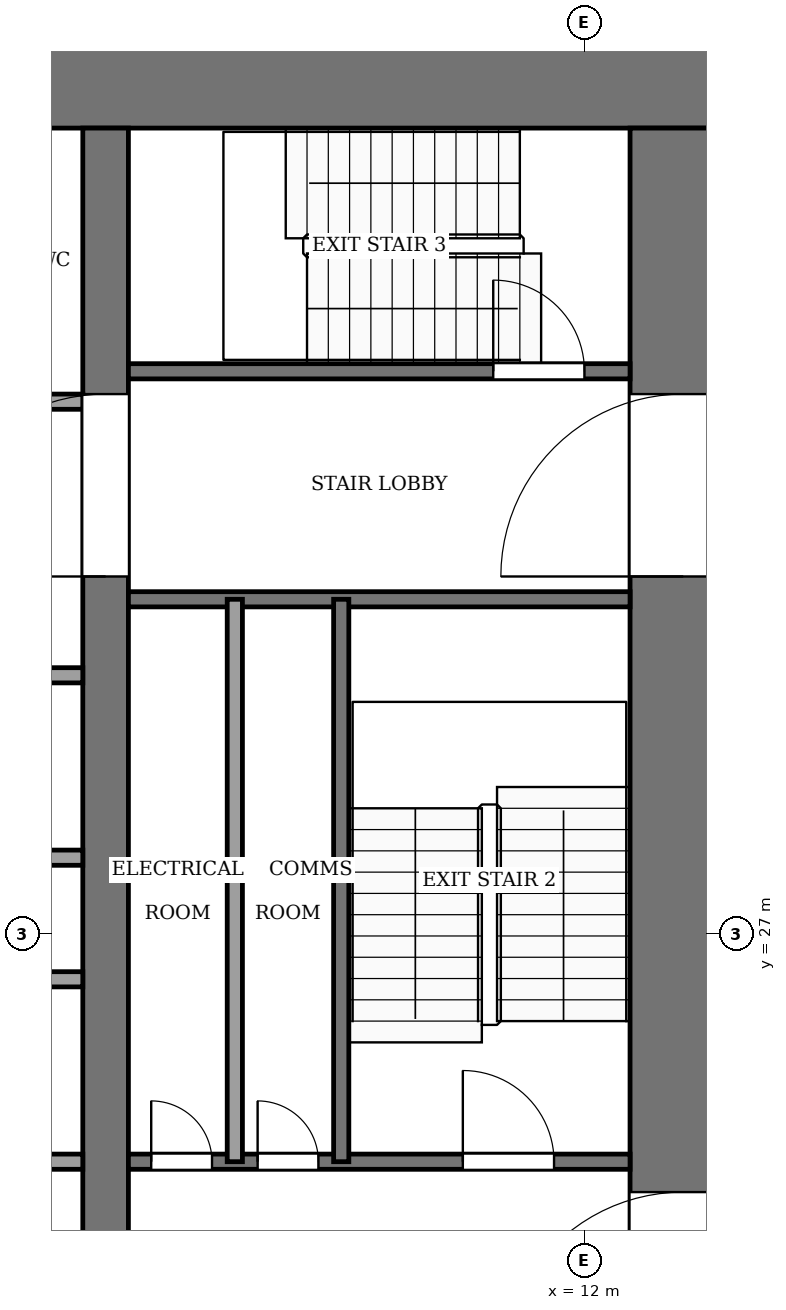
"""IFC4 building model, lengths in metres.
Left out: names, types, materials, properties, quantities, classifications, styles, units other than length and angle.
Written with IfcOpenShell. Run it as: python <this file> out.ifc"""

import sys

from ifc_helpers import new_model, si_unit, direction, frame, frame_2d, origin, place, context, subcontext, project, spatial, rectangle, extrude, element, fill, save


model = new_model("IFC4")
c1 = context("Model", 3, precision=1e-05, world=origin(), true_north=direction((0.0, 1.0)))
c2 = subcontext(c1, "Body", "Model", "MODEL_VIEW")
j1 = project(units=[si_unit("LENGTHUNIT", "METRE"), si_unit("PLANEANGLEUNIT", "RADIAN")], contexts=[c1])
p1 = place(None, origin())
s1 = spatial("IfcSite", under=j1, at=p1, CompositionType="ELEMENT")
p2 = place(p1, origin())
s2 = spatial("IfcBuilding", under=s1, at=p2, CompositionType="ELEMENT")
p3 = place(p2, frame((0.0, 0.0, 46.0)))
s3 = spatial("IfcBuildingStorey", under=s2, at=p3, CompositionType="ELEMENT", Elevation=46.0)
p4 = place(p3, frame((-14.0, 38.3, -0.13), z_axis=(0.0, 0.0, 1.0), x_axis=(1.0, 0.0, 0.0)))
e1 = element("IfcWall", 1, at=p4, inside=s3, PredefinedType="SHEAR", context=c2, shape_type="SweptSolid", body=[
    extrude(rectangle(XDim=28.0, YDim=1.4, at=frame_2d((14.0, 0.0))), origin(), (0.0, 0.0, 1.0), 4.0),
])
p5 = place(p3, frame((13.3, 18.4, -0.13), z_axis=(0.0, 0.0, 1.0), x_axis=(0.0, 1.0, 0.0)))
e2 = element("IfcWall", 2, at=p5, inside=s3, PredefinedType="SHEAR", context=c2, shape_type="SweptSolid", body=[
    extrude(rectangle(XDim=19.2, YDim=1.4, at=frame_2d((9.6, 0.0))), origin(), (0.0, 0.0, 1.0), 4.0),
])
p6 = place(p5, frame((2.8, 0.0, 0.13)))
e3 = element("IfcOpeningElement", 3, at=p6, cuts=e2, PredefinedType="OPENING", context=c2, shape_type="SweptSolid", body=[
    extrude(rectangle(XDim=2.4, YDim=2.4, at=frame_2d((1.2, 1.2))), frame((0.0, 0.71, 0.0), z_axis=(0.0, -1.0, 0.0), x_axis=(1.0, 0.0, 0.0)), (0.0, 0.0, 1.0), 1.42),
])
p7 = place(p5, frame((13.3, 0.0, 0.13)))
e4 = element("IfcOpeningElement", 4, at=p7, cuts=e2, PredefinedType="OPENING", context=c2, shape_type="SweptSolid", body=[
    extrude(rectangle(XDim=2.4, YDim=2.4, at=frame_2d((1.2, 1.2))), frame((0.0, 0.71, 0.0), z_axis=(0.0, -1.0, 0.0), x_axis=(1.0, 0.0, 0.0)), (0.0, 0.0, 1.0), 1.42),
])
p8 = place(p3, frame((5.7, 18.4, -0.13), z_axis=(0.0, 0.0, 1.0), x_axis=(0.0, 1.0, 0.0)))
e5 = element("IfcWall", 5, at=p8, inside=s3, PredefinedType="SHEAR", context=c2, shape_type="SweptSolid", body=[
    extrude(rectangle(XDim=19.2, YDim=0.6, at=frame_2d((9.6, 0.0))), origin(), (0.0, 0.0, 1.0), 4.0),
])
p9 = place(p8, frame((13.3, 0.0, 0.13)))
e6 = element("IfcOpeningElement", 6, at=p9, cuts=e5, PredefinedType="OPENING", context=c2, shape_type="SweptSolid", body=[
    extrude(rectangle(XDim=2.4, YDim=2.4, at=frame_2d((1.2, 1.2))), frame((0.0, 0.31, 0.0), z_axis=(0.0, -1.0, 0.0), x_axis=(1.0, 0.0, 0.0)), (0.0, 0.0, 1.0), 0.62),
])
p10 = place(p3, frame((-5.4, 24.0, 0.0), z_axis=(0.0, 0.0, 1.0), x_axis=(1.0, 0.0, 0.0)))
e7 = element("IfcWall", 7, at=p10, inside=s3, PredefinedType="PARTITIONING", context=c2, shape_type="SweptSolid", body=[
    extrude(rectangle(XDim=10.8, YDim=0.2, at=frame_2d((5.4, 0.0))), origin(), (0.0, 0.0, 1.0), 3.87),
])
p11 = place(p10, frame((0.75, 0.0, 0.0)))
e8 = element("IfcOpeningElement", 8, at=p11, cuts=e7, PredefinedType="OPENING", context=c2, shape_type="SweptSolid", body=[
    extrude(rectangle(XDim=1.2, YDim=2.2, at=frame_2d((0.6, 1.1))), frame((0.0, 0.11, 0.0), z_axis=(0.0, -1.0, 0.0), x_axis=(1.0, 0.0, 0.0)), (0.0, 0.0, 1.0), 0.22),
])
p12 = place(p10, frame((3.45, 0.0, 0.0)))
e9 = element("IfcOpeningElement", 9, at=p12, cuts=e7, PredefinedType="OPENING", context=c2, shape_type="SweptSolid", body=[
    extrude(rectangle(XDim=1.2, YDim=2.2, at=frame_2d((0.6, 1.1))), frame((0.0, 0.11, 0.0), z_axis=(0.0, -1.0, 0.0), x_axis=(1.0, 0.0, 0.0)), (0.0, 0.0, 1.0), 0.22),
])
p13 = place(p10, frame((6.15, 0.0, 0.0)))
e10 = element("IfcOpeningElement", 10, at=p13, cuts=e7, PredefinedType="OPENING", context=c2, shape_type="SweptSolid", body=[
    extrude(rectangle(XDim=1.2, YDim=2.2, at=frame_2d((0.6, 1.1))), frame((0.0, 0.11, 0.0), z_axis=(0.0, -1.0, 0.0), x_axis=(1.0, 0.0, 0.0)), (0.0, 0.0, 1.0), 0.22),
])
p14 = place(p10, frame((8.85, 0.0, 0.0)))
e11 = element("IfcOpeningElement", 11, at=p14, cuts=e7, PredefinedType="OPENING", context=c2, shape_type="SweptSolid", body=[
    extrude(rectangle(XDim=1.2, YDim=2.2, at=frame_2d((0.6, 1.1))), frame((0.0, 0.11, 0.0), z_axis=(0.0, -1.0, 0.0), x_axis=(1.0, 0.0, 0.0)), (0.0, 0.0, 1.0), 0.22),
])
p15 = place(p3, frame((6.0, 24.0, 0.0), z_axis=(0.0, 0.0, 1.0), x_axis=(1.0, 0.0, 0.0)))
e12 = element("IfcWall", 12, at=p15, inside=s3, PredefinedType="PARTITIONING", context=c2, shape_type="SweptSolid", body=[
    extrude(rectangle(XDim=6.6, YDim=0.2, at=frame_2d((3.3, 0.0))), origin(), (0.0, 0.0, 1.0), 3.87),
])
p16 = place(p15, frame((0.3, 0.0, 0.0)))
e13 = element("IfcOpeningElement", 13, at=p16, cuts=e12, PredefinedType="OPENING", context=c2, shape_type="SweptSolid", body=[
    extrude(rectangle(XDim=0.8, YDim=2.1, at=frame_2d((0.4, 1.05))), frame((0.0, 0.11, 0.0), z_axis=(0.0, -1.0, 0.0), x_axis=(1.0, 0.0, 0.0)), (0.0, 0.0, 1.0), 0.22),
])
p17 = place(p15, frame((1.7, 0.0, 0.0)))
e14 = element("IfcOpeningElement", 14, at=p17, cuts=e12, PredefinedType="OPENING", context=c2, shape_type="SweptSolid", body=[
    extrude(rectangle(XDim=0.8, YDim=2.1, at=frame_2d((0.4, 1.05))), frame((0.0, 0.11, 0.0), z_axis=(0.0, -1.0, 0.0), x_axis=(1.0, 0.0, 0.0)), (0.0, 0.0, 1.0), 0.22),
])
p18 = place(p15, frame((4.4, 0.0, 0.0)))
e15 = element("IfcOpeningElement", 15, at=p18, cuts=e12, PredefinedType="OPENING", context=c2, shape_type="SweptSolid", body=[
    extrude(rectangle(XDim=1.2, YDim=2.2, at=frame_2d((0.6, 1.1))), frame((0.0, 0.11, 0.0), z_axis=(0.0, -1.0, 0.0), x_axis=(1.0, 0.0, 0.0)), (0.0, 0.0, 1.0), 0.22),
])
for number, where, z_axis, x_axis in (
    (16, (-5.4, 26.4, 0.0), (0.0, 0.0, 1.0), (1.0, 0.0, 0.0)),
    (17, (-5.4, 28.0, 0.0), (0.0, 0.0, 1.0), (1.0, 0.0, 0.0)),
    (18, (-5.4, 30.4, 0.0), (0.0, 0.0, 1.0), (1.0, 0.0, 0.0)),
):
    element("IfcWall", number, at=place(p3, frame(where, z_axis=z_axis, x_axis=x_axis)), inside=s3, PredefinedType="PARTITIONING", context=c2, shape_type="SweptSolid", body=[
        extrude(rectangle(XDim=10.8, YDim=0.2, at=frame_2d((5.4, 0.0))), origin(), (0.0, 0.0, 1.0), 3.87),
    ])
p19 = place(p3, frame((6.0, 31.4, 0.0), z_axis=(0.0, 0.0, 1.0), x_axis=(1.0, 0.0, 0.0)))
e19 = element("IfcWall", 19, at=p19, inside=s3, PredefinedType="PARTITIONING", context=c2, shape_type="SweptSolid", body=[
    extrude(rectangle(XDim=6.6, YDim=0.2, at=frame_2d((3.3, 0.0))), origin(), (0.0, 0.0, 1.0), 3.87),
])
p20 = place(p3, frame((-5.4, 34.0, 0.0), z_axis=(0.0, 0.0, 1.0), x_axis=(1.0, 0.0, 0.0)))
e20 = element("IfcWall", 20, at=p20, inside=s3, PredefinedType="PARTITIONING", context=c2, shape_type="SweptSolid", body=[
    extrude(rectangle(XDim=10.8, YDim=0.2, at=frame_2d((5.4, 0.0))), origin(), (0.0, 0.0, 1.0), 3.87),
])
p21 = place(p20, frame((6.15, 0.0, 0.0)))
e21 = element("IfcOpeningElement", 21, at=p21, cuts=e20, PredefinedType="OPENING", context=c2, shape_type="SweptSolid", body=[
    extrude(rectangle(XDim=1.2, YDim=2.2, at=frame_2d((0.6, 1.1))), frame((0.0, 0.11, 0.0), z_axis=(0.0, -1.0, 0.0), x_axis=(1.0, 0.0, 0.0)), (0.0, 0.0, 1.0), 0.22),
])
p22 = place(p20, frame((8.95, 0.0, 0.0)))
e22 = element("IfcOpeningElement", 22, at=p22, cuts=e20, PredefinedType="OPENING", context=c2, shape_type="SweptSolid", body=[
    extrude(rectangle(XDim=1.0, YDim=2.1, at=frame_2d((0.5, 1.05))), frame((0.0, 0.11, 0.0), z_axis=(0.0, -1.0, 0.0), x_axis=(1.0, 0.0, 0.0)), (0.0, 0.0, 1.0), 0.22),
])
p23 = place(p3, frame((6.0, 34.4, 0.0), z_axis=(0.0, 0.0, 1.0), x_axis=(1.0, 0.0, 0.0)))
e23 = element("IfcWall", 23, at=p23, inside=s3, PredefinedType="PARTITIONING", context=c2, shape_type="SweptSolid", body=[
    extrude(rectangle(XDim=6.6, YDim=0.2, at=frame_2d((3.3, 0.0))), origin(), (0.0, 0.0, 1.0), 3.87),
])
p24 = place(p23, frame((4.8, 0.0, 0.0)))
e24 = element("IfcOpeningElement", 24, at=p24, cuts=e23, PredefinedType="OPENING", context=c2, shape_type="SweptSolid", body=[
    extrude(rectangle(XDim=1.2, YDim=2.2, at=frame_2d((0.6, 1.1))), frame((0.0, 0.11, 0.0), z_axis=(0.0, -1.0, 0.0), x_axis=(1.0, 0.0, 0.0)), (0.0, 0.0, 1.0), 0.22),
])
for number, where, z_axis, x_axis in (
    (25, (7.4, 24.0, 0.0), (0.0, 0.0, 1.0), (0.0, 1.0, 0.0)),
    (26, (8.8, 24.0, 0.0), (0.0, 0.0, 1.0), (0.0, 1.0, 0.0)),
):
    element("IfcWall", number, at=place(p3, frame(where, z_axis=z_axis, x_axis=x_axis)), inside=s3, PredefinedType="PARTITIONING", context=c2, shape_type="SweptSolid", body=[
        extrude(rectangle(XDim=7.4, YDim=0.2, at=frame_2d((3.7, 0.0))), origin(), (0.0, 0.0, 1.0), 3.87),
    ])
p25 = place(p16, origin())
e27 = element("IfcDoor", 27, at=p25, inside=s3, OperationType="SINGLE_SWING_LEFT", PredefinedType="DOOR", context=c2, shape_type="SweptSolid", body=[
    extrude(rectangle(XDim=0.8, YDim=2.1, at=frame_2d((0.4, 1.05))), frame((0.0, 0.025, 0.0), z_axis=(0.0, -1.0, 0.0), x_axis=(1.0, 0.0, 0.0)), (0.0, 0.0, 1.0), 0.05),
])
fill(e13, e27)
p26 = place(p17, origin())
e28 = element("IfcDoor", 28, at=p26, inside=s3, OperationType="SINGLE_SWING_RIGHT", PredefinedType="DOOR", context=c2, shape_type="SweptSolid", body=[
    extrude(rectangle(XDim=0.8, YDim=2.1, at=frame_2d((0.4, 1.05))), frame((0.0, 0.025, 0.0), z_axis=(0.0, -1.0, 0.0), x_axis=(1.0, 0.0, 0.0)), (0.0, 0.0, 1.0), 0.05),
])
fill(e14, e28)
p27 = place(p18, origin())
e29 = element("IfcDoor", 29, at=p27, inside=s3, OperationType="SINGLE_SWING_LEFT", PredefinedType="DOOR", context=c2, shape_type="SweptSolid", body=[
    extrude(rectangle(XDim=1.2, YDim=2.2, at=frame_2d((0.6, 1.1))), frame((0.0, 0.025, 0.0), z_axis=(0.0, -1.0, 0.0), x_axis=(1.0, 0.0, 0.0)), (0.0, 0.0, 1.0), 0.05),
])
fill(e15, e29)
p28 = place(p24, origin())
e30 = element("IfcDoor", 30, at=p28, inside=s3, OperationType="SINGLE_SWING_RIGHT", PredefinedType="DOOR", context=c2, shape_type="SweptSolid", body=[
    extrude(rectangle(XDim=1.2, YDim=2.2, at=frame_2d((0.6, 1.1))), frame((0.0, 0.025, 0.0), z_axis=(0.0, -1.0, 0.0), x_axis=(1.0, 0.0, 0.0)), (0.0, 0.0, 1.0), 0.05),
])
fill(e24, e30)
p29 = place(p9, origin())
e31 = element("IfcDoor", 31, at=p29, inside=s3, OperationType="DOUBLE_DOOR_SINGLE_SWING", PredefinedType="DOOR", context=c2, shape_type="SweptSolid", body=[
    extrude(rectangle(XDim=2.4, YDim=2.4, at=frame_2d((1.2, 1.2))), frame((0.0, 0.025, 0.0), z_axis=(0.0, -1.0, 0.0), x_axis=(1.0, 0.0, 0.0)), (0.0, 0.0, 1.0), 0.05),
])
fill(e6, e31)
p30 = place(p6, origin())
e32 = element("IfcDoor", 32, at=p30, inside=s3, OperationType="DOUBLE_DOOR_SINGLE_SWING", PredefinedType="DOOR", context=c2, shape_type="SweptSolid", body=[
    extrude(rectangle(XDim=2.4, YDim=2.4, at=frame_2d((1.2, 1.2))), frame((0.0, 0.025, 0.0), z_axis=(0.0, -1.0, 0.0), x_axis=(1.0, 0.0, 0.0)), (0.0, 0.0, 1.0), 0.05),
])
fill(e3, e32)
p31 = place(p7, origin())
e33 = element("IfcDoor", 33, at=p31, inside=s3, OperationType="DOUBLE_DOOR_SINGLE_SWING", PredefinedType="DOOR", context=c2, shape_type="SweptSolid", body=[
    extrude(rectangle(XDim=2.4, YDim=2.4, at=frame_2d((1.2, 1.2))), frame((0.0, 0.025, 0.0), z_axis=(0.0, -1.0, 0.0), x_axis=(1.0, 0.0, 0.0)), (0.0, 0.0, 1.0), 0.05),
])
fill(e4, e33)
save(model, sys.argv[1])
